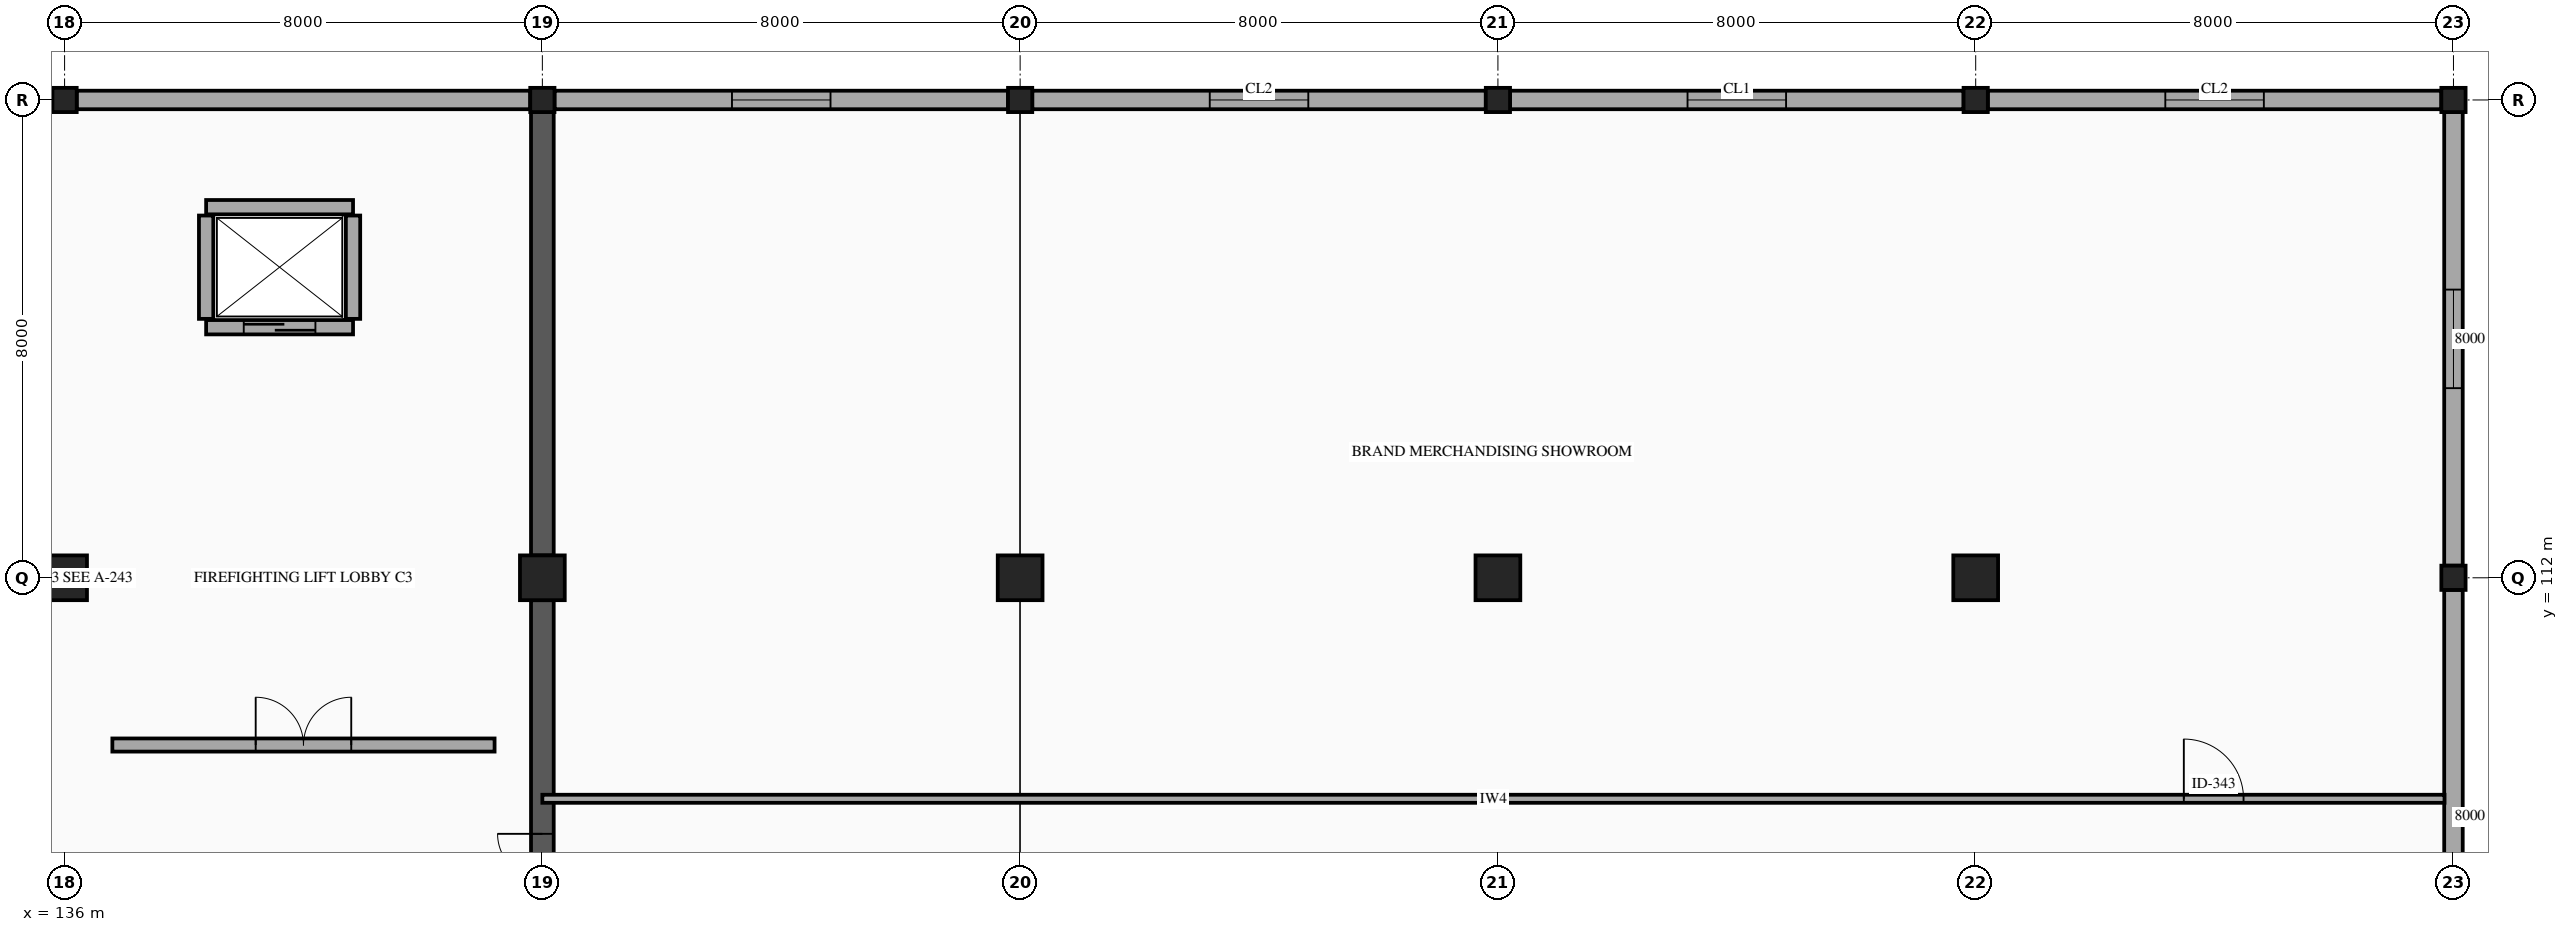
"""IFC4 building model, lengths in metres.
Left out: names, types, materials, properties, quantities, classifications, styles, units other than length and angle.
Written with IfcOpenShell. Run it as: python <this file> out.ifc"""

import sys

from ifc_helpers import new_model, si_unit, direction, frame, frame_2d, origin, origin_2d, place, context, subcontext, project, spatial, rectangle, hollow_rectangle, extrude, element, fill, save


model = new_model("IFC4")
c1 = context("Model", 3, precision=1e-05, world=origin(), true_north=direction((0.0, 1.0)))
c2 = subcontext(c1, "Body", "Model", "MODEL_VIEW")
j1 = project(units=[si_unit("LENGTHUNIT", "METRE"), si_unit("PLANEANGLEUNIT", "RADIAN")], contexts=[c1])
p1 = place(None, origin())
s1 = spatial("IfcSite", under=j1, at=p1, CompositionType="ELEMENT")
p2 = place(p1, origin())
s2 = spatial("IfcBuilding", under=s1, at=p2, CompositionType="ELEMENT")
p3 = place(p2, frame((0.0, 0.0, 14.9)))
s3 = spatial("IfcBuildingStorey", under=s2, at=p3, CompositionType="ELEMENT", Elevation=14.9)
p4 = place(p3, frame((136.0, 112.0, 0.0), z_axis=(0.0, 0.0, 1.0), x_axis=(1.0, 0.0, 0.0)))
e1 = element("IfcColumn", 1, at=p4, inside=s3, PredefinedType="COLUMN", context=c2, shape_type="SweptSolid", body=[
    extrude(rectangle(XDim=0.75, YDim=0.75, at=origin_2d()), origin(), (0.0, 0.0, 1.0), 4.5),
])
p5 = place(p3, frame((136.0, 120.0, 0.0), z_axis=(0.0, 0.0, 1.0), x_axis=(1.0, 0.0, 0.0)))
e2 = element("IfcColumn", 2, at=p5, inside=s3, PredefinedType="COLUMN", context=c2, shape_type="SweptSolid", body=[
    extrude(hollow_rectangle(XDim=0.406, YDim=0.406, WallThickness=0.015, InnerFilletRadius=0.015, OuterFilletRadius=0.029, at=origin_2d()), origin(), (0.0, 0.0, 1.0), 4.5),
])
p6 = place(p3, frame((144.0, 112.0, 0.0), z_axis=(0.0, 0.0, 1.0), x_axis=(1.0, 0.0, 0.0)))
e3 = element("IfcColumn", 3, at=p6, inside=s3, PredefinedType="COLUMN", context=c2, shape_type="SweptSolid", body=[
    extrude(rectangle(XDim=0.75, YDim=0.75, at=origin_2d()), origin(), (0.0, 0.0, 1.0), 4.5),
])
p7 = place(p3, frame((144.0, 120.0, 0.0), z_axis=(0.0, 0.0, 1.0), x_axis=(1.0, 0.0, 0.0)))
e4 = element("IfcColumn", 4, at=p7, inside=s3, PredefinedType="COLUMN", context=c2, shape_type="SweptSolid", body=[
    extrude(hollow_rectangle(XDim=0.406, YDim=0.406, WallThickness=0.015, InnerFilletRadius=0.015, OuterFilletRadius=0.029, at=origin_2d()), origin(), (0.0, 0.0, 1.0), 4.5),
])
p8 = place(p3, frame((152.0, 112.0, 0.0), z_axis=(0.0, 0.0, 1.0), x_axis=(1.0, 0.0, 0.0)))
e5 = element("IfcColumn", 5, at=p8, inside=s3, PredefinedType="COLUMN", context=c2, shape_type="SweptSolid", body=[
    extrude(rectangle(XDim=0.75, YDim=0.75, at=origin_2d()), origin(), (0.0, 0.0, 1.0), 4.5),
])
p9 = place(p3, frame((152.0, 120.0, 0.0), z_axis=(0.0, 0.0, 1.0), x_axis=(1.0, 0.0, 0.0)))
e6 = element("IfcColumn", 6, at=p9, inside=s3, PredefinedType="COLUMN", context=c2, shape_type="SweptSolid", body=[
    extrude(hollow_rectangle(XDim=0.406, YDim=0.406, WallThickness=0.015, InnerFilletRadius=0.015, OuterFilletRadius=0.029, at=origin_2d()), origin(), (0.0, 0.0, 1.0), 4.5),
])
p10 = place(p3, frame((160.0, 112.0, 0.0), z_axis=(0.0, 0.0, 1.0), x_axis=(1.0, 0.0, 0.0)))
e7 = element("IfcColumn", 7, at=p10, inside=s3, PredefinedType="COLUMN", context=c2, shape_type="SweptSolid", body=[
    extrude(rectangle(XDim=0.75, YDim=0.75, at=origin_2d()), origin(), (0.0, 0.0, 1.0), 4.5),
])
p11 = place(p3, frame((160.0, 120.0, 0.0), z_axis=(0.0, 0.0, 1.0), x_axis=(1.0, 0.0, 0.0)))
e8 = element("IfcColumn", 8, at=p11, inside=s3, PredefinedType="COLUMN", context=c2, shape_type="SweptSolid", body=[
    extrude(hollow_rectangle(XDim=0.406, YDim=0.406, WallThickness=0.015, InnerFilletRadius=0.015, OuterFilletRadius=0.029, at=origin_2d()), origin(), (0.0, 0.0, 1.0), 4.5),
])
p12 = place(p3, frame((168.0, 112.0, 0.0), z_axis=(0.0, 0.0, 1.0), x_axis=(1.0, 0.0, 0.0)))
e9 = element("IfcColumn", 9, at=p12, inside=s3, PredefinedType="COLUMN", context=c2, shape_type="SweptSolid", body=[
    extrude(rectangle(XDim=0.75, YDim=0.75, at=origin_2d()), origin(), (0.0, 0.0, 1.0), 4.5),
])
for number, where, z_axis, x_axis in (
    (10, (168.0, 120.0, 0.0), (0.0, 0.0, 1.0), (1.0, 0.0, 0.0)),
    (11, (176.0, 112.0, 0.0), (0.0, 0.0, 1.0), (1.0, 0.0, 0.0)),
    (12, (176.0, 120.0, 0.0), (0.0, 0.0, 1.0), (1.0, 0.0, 0.0)),
):
    element("IfcColumn", number, at=place(p3, frame(where, z_axis=z_axis, x_axis=x_axis)), inside=s3, PredefinedType="COLUMN", context=c2, shape_type="SweptSolid", body=[
        extrude(hollow_rectangle(XDim=0.406, YDim=0.406, WallThickness=0.015, InnerFilletRadius=0.015, OuterFilletRadius=0.029, at=origin_2d()), origin(), (0.0, 0.0, 1.0), 4.5),
    ])
p13 = place(p3, frame((152.203, 120.0, 0.0), z_axis=(0.0, 0.0, 1.0), x_axis=(1.0, 0.0, 0.0)))
e13 = element("IfcWall", 13, at=p13, inside=s3, PredefinedType="STANDARD", context=c2, shape_type="SweptSolid", body=[
    extrude(rectangle(XDim=7.594, YDim=0.31, at=frame_2d((3.797, 0.0))), origin(), (0.0, 0.0, 1.0), 3.48),
])
p14 = place(p13, frame((2.972, 0.0, 0.8)))
e14 = element("IfcOpeningElement", 14, at=p14, cuts=e13, PredefinedType="OPENING", context=c2, shape_type="SweptSolid", body=[
    extrude(rectangle(XDim=1.65, YDim=2.3, at=frame_2d((0.825, 1.15))), frame((0.0, 0.165, 0.0), z_axis=(0.0, -1.0, 0.0), x_axis=(1.0, 0.0, 0.0)), (0.0, 0.0, 1.0), 0.33),
])
p15 = place(p3, frame((160.203, 120.0, 0.0), z_axis=(0.0, 0.0, 1.0), x_axis=(1.0, 0.0, 0.0)))
e15 = element("IfcWall", 15, at=p15, inside=s3, PredefinedType="STANDARD", context=c2, shape_type="SweptSolid", body=[
    extrude(rectangle(XDim=7.594, YDim=0.31, at=frame_2d((3.797, 0.0))), origin(), (0.0, 0.0, 1.0), 3.48),
])
p16 = place(p15, frame((2.972, 0.0, 0.8)))
e16 = element("IfcOpeningElement", 16, at=p16, cuts=e15, PredefinedType="OPENING", context=c2, shape_type="SweptSolid", body=[
    extrude(rectangle(XDim=1.65, YDim=2.3, at=frame_2d((0.825, 1.15))), frame((0.0, 0.165, 0.0), z_axis=(0.0, -1.0, 0.0), x_axis=(1.0, 0.0, 0.0)), (0.0, 0.0, 1.0), 0.33),
])
p17 = place(p3, frame((168.203, 120.0, 0.0), z_axis=(0.0, 0.0, 1.0), x_axis=(1.0, 0.0, 0.0)))
e17 = element("IfcWall", 17, at=p17, inside=s3, PredefinedType="STANDARD", context=c2, shape_type="SweptSolid", body=[
    extrude(rectangle(XDim=7.594, YDim=0.31, at=frame_2d((3.797, 0.0))), origin(), (0.0, 0.0, 1.0), 3.48),
])
p18 = place(p17, frame((2.972, 0.0, 0.8)))
e18 = element("IfcOpeningElement", 18, at=p18, cuts=e17, PredefinedType="OPENING", context=c2, shape_type="SweptSolid", body=[
    extrude(rectangle(XDim=1.65, YDim=2.3, at=frame_2d((0.825, 1.15))), frame((0.0, 0.165, 0.0), z_axis=(0.0, -1.0, 0.0), x_axis=(1.0, 0.0, 0.0)), (0.0, 0.0, 1.0), 0.33),
])
p19 = place(p3, frame((176.0, 119.797, 0.0), z_axis=(0.0, 0.0, 1.0), x_axis=(0.0, -1.0, 0.0)))
e19 = element("IfcWall", 19, at=p19, inside=s3, PredefinedType="STANDARD", context=c2, shape_type="SweptSolid", body=[
    extrude(rectangle(XDim=7.594, YDim=0.31, at=frame_2d((3.797, 0.0))), origin(), (0.0, 0.0, 1.0), 3.48),
])
p20 = place(p19, frame((2.972, 0.0, 0.8)))
e20 = element("IfcOpeningElement", 20, at=p20, cuts=e19, PredefinedType="OPENING", context=c2, shape_type="SweptSolid", body=[
    extrude(rectangle(XDim=1.65, YDim=2.3, at=frame_2d((0.825, 1.15))), frame((0.0, 0.165, 0.0), z_axis=(0.0, -1.0, 0.0), x_axis=(1.0, 0.0, 0.0)), (0.0, 0.0, 1.0), 0.33),
])
for number, where, z_axis, x_axis in (
    (21, (176.0, 111.797, 0.0), (0.0, 0.0, 1.0), (0.0, -1.0, 0.0)),
    (22, (136.203, 120.0, 0.0), (0.0, 0.0, 1.0), (1.0, 0.0, 0.0)),
):
    element("IfcWall", number, at=place(p3, frame(where, z_axis=z_axis, x_axis=x_axis)), inside=s3, PredefinedType="STANDARD", context=c2, shape_type="SweptSolid", body=[
        extrude(rectangle(XDim=7.594, YDim=0.31, at=frame_2d((3.797, 0.0))), origin(), (0.0, 0.0, 1.0), 3.48),
    ])
p21 = place(p3, frame((144.203, 120.0, 0.0), z_axis=(0.0, 0.0, 1.0), x_axis=(1.0, 0.0, 0.0)))
e23 = element("IfcWall", 23, at=p21, inside=s3, PredefinedType="STANDARD", context=c2, shape_type="SweptSolid", body=[
    extrude(rectangle(XDim=7.594, YDim=0.31, at=frame_2d((3.797, 0.0))), origin(), (0.0, 0.0, 1.0), 3.48),
])
p22 = place(p21, frame((2.972, 0.0, 0.8)))
e24 = element("IfcOpeningElement", 24, at=p22, cuts=e23, PredefinedType="OPENING", context=c2, shape_type="SweptSolid", body=[
    extrude(rectangle(XDim=1.65, YDim=2.3, at=frame_2d((0.825, 1.15))), frame((0.0, 0.165, 0.0), z_axis=(0.0, -1.0, 0.0), x_axis=(1.0, 0.0, 0.0)), (0.0, 0.0, 1.0), 0.33),
])
p23 = place(p3, frame((144.0, 104.375, 0.0), z_axis=(0.0, 0.0, 1.0), x_axis=(0.0, 1.0, 0.0)))
e25 = element("IfcWall", 25, at=p23, inside=s3, PredefinedType="SHEAR", context=c2, shape_type="SweptSolid", body=[
    extrude(rectangle(XDim=7.25, YDim=0.38, at=frame_2d((3.625, 0.0))), origin(), (0.0, 0.0, 1.0), 4.28),
])
p24 = place(p23, frame((1.838, 0.0, 0.0)))
e26 = element("IfcOpeningElement", 26, at=p24, cuts=e25, PredefinedType="OPENING", context=c2, shape_type="SweptSolid", body=[
    extrude(rectangle(XDim=1.5, YDim=2.15, at=frame_2d((0.75, 1.075))), frame((0.0, 0.2, 0.0), z_axis=(0.0, -1.0, 0.0), x_axis=(1.0, 0.0, 0.0)), (0.0, 0.0, 1.0), 0.4),
])
p25 = place(p3, frame((144.0, 112.375, 0.0), z_axis=(0.0, 0.0, 1.0), x_axis=(0.0, 1.0, 0.0)))
e27 = element("IfcWall", 27, at=p25, inside=s3, PredefinedType="SHEAR", context=c2, shape_type="SweptSolid", body=[
    extrude(rectangle(XDim=7.422, YDim=0.38, at=frame_2d((3.711, 0.0))), origin(), (0.0, 0.0, 1.0), 4.28),
])
p26 = place(p3, frame((138.37, 116.195, 0.0), z_axis=(0.0, 0.0, 1.0), x_axis=(1.0, 0.0, 0.0)))
e28 = element("IfcWall", 28, at=p26, inside=s3, PredefinedType="PARTITIONING", context=c2, shape_type="SweptSolid", body=[
    extrude(rectangle(XDim=2.46, YDim=0.24, at=frame_2d((1.23, 0.0))), origin(), (0.0, 0.0, 1.0), 4.28),
])
p27 = place(p26, frame((0.63, 0.0, 0.0)))
e29 = element("IfcOpeningElement", 29, at=p27, cuts=e28, PredefinedType="OPENING", context=c2, shape_type="SweptSolid", body=[
    extrude(rectangle(XDim=1.2, YDim=2.15, at=frame_2d((0.6, 1.075))), frame((0.0, 0.13, 0.0), z_axis=(0.0, -1.0, 0.0), x_axis=(1.0, 0.0, 0.0)), (0.0, 0.0, 1.0), 0.26),
])
p28 = place(p3, frame((138.37, 118.205, 0.0), z_axis=(0.0, 0.0, 1.0), x_axis=(1.0, 0.0, 0.0)))
e30 = element("IfcWall", 30, at=p28, inside=s3, PredefinedType="PARTITIONING", context=c2, shape_type="SweptSolid", body=[
    extrude(rectangle(XDim=2.46, YDim=0.24, at=frame_2d((1.23, 0.0))), origin(), (0.0, 0.0, 1.0), 4.28),
])
for number, where, z_axis, x_axis in (
    (31, (138.37, 116.335, 0.0), (0.0, 0.0, 1.0), (0.0, 1.0, 0.0)),
    (32, (140.83, 116.335, 0.0), (0.0, 0.0, 1.0), (0.0, 1.0, 0.0)),
):
    element("IfcWall", number, at=place(p3, frame(where, z_axis=z_axis, x_axis=x_axis)), inside=s3, PredefinedType="PARTITIONING", context=c2, shape_type="SweptSolid", body=[
        extrude(rectangle(XDim=1.73, YDim=0.24, at=frame_2d((0.865, 0.0))), origin(), (0.0, 0.0, 1.0), 4.28),
    ])
p29 = place(p3, frame((136.8, 109.2, 0.0), z_axis=(0.0, 0.0, 1.0), x_axis=(1.0, 0.0, 0.0)))
e33 = element("IfcWall", 33, at=p29, inside=s3, PredefinedType="PARTITIONING", context=c2, shape_type="SweptSolid", body=[
    extrude(rectangle(XDim=6.4, YDim=0.22, at=frame_2d((3.2, 0.0))), origin(), (0.0, 0.0, 1.0), 3.48),
])
p30 = place(p29, frame((2.4, 0.0, 0.0)))
e34 = element("IfcOpeningElement", 34, at=p30, cuts=e33, PredefinedType="OPENING", context=c2, shape_type="SweptSolid", body=[
    extrude(rectangle(XDim=1.6, YDim=2.15, at=frame_2d((0.8, 1.075))), frame((0.0, 0.12, 0.0), z_axis=(0.0, -1.0, 0.0), x_axis=(1.0, 0.0, 0.0)), (0.0, 0.0, 1.0), 0.24),
])
p31 = place(p3, frame((144.0, 108.3, 0.0), z_axis=(0.0, 0.0, 1.0), x_axis=(1.0, 0.0, 0.0)))
e35 = element("IfcWall", 35, at=p31, inside=s3, PredefinedType="PARTITIONING", context=c2, shape_type="SweptSolid", body=[
    extrude(rectangle(XDim=31.85, YDim=0.135, at=frame_2d((15.925, 0.0))), origin(), (0.0, 0.0, 1.0), 3.48),
])
p32 = place(p31, frame((27.485, 0.0, 0.0)))
e36 = element("IfcOpeningElement", 36, at=p32, cuts=e35, PredefinedType="OPENING", context=c2, shape_type="SweptSolid", body=[
    extrude(rectangle(XDim=1.0, YDim=2.15, at=frame_2d((0.5, 1.075))), frame((0.0, 0.077, 0.0), z_axis=(0.0, -1.0, 0.0), x_axis=(1.0, 0.0, 0.0)), (0.0, 0.0, 1.0), 0.155),
])
p33 = place(p14, origin())
e37 = element("IfcWindow", 37, at=p33, inside=s3, PartitioningType="DOUBLE_PANEL_HORIZONTAL", PredefinedType="WINDOW", context=c2, shape_type="SweptSolid", body=[
    extrude(rectangle(XDim=1.65, YDim=2.3, at=frame_2d((0.825, 1.15))), frame((0.0, 0.03, 0.0), z_axis=(0.0, -1.0, 0.0), x_axis=(1.0, 0.0, 0.0)), (0.0, 0.0, 1.0), 0.06),
])
fill(e14, e37)
p34 = place(p16, origin())
e38 = element("IfcWindow", 38, at=p34, inside=s3, PartitioningType="DOUBLE_PANEL_HORIZONTAL", PredefinedType="WINDOW", context=c2, shape_type="SweptSolid", body=[
    extrude(rectangle(XDim=1.65, YDim=2.3, at=frame_2d((0.825, 1.15))), frame((0.0, 0.03, 0.0), z_axis=(0.0, -1.0, 0.0), x_axis=(1.0, 0.0, 0.0)), (0.0, 0.0, 1.0), 0.06),
])
fill(e16, e38)
p35 = place(p18, origin())
e39 = element("IfcWindow", 39, at=p35, inside=s3, PartitioningType="DOUBLE_PANEL_HORIZONTAL", PredefinedType="WINDOW", context=c2, shape_type="SweptSolid", body=[
    extrude(rectangle(XDim=1.65, YDim=2.3, at=frame_2d((0.825, 1.15))), frame((0.0, 0.03, 0.0), z_axis=(0.0, -1.0, 0.0), x_axis=(1.0, 0.0, 0.0)), (0.0, 0.0, 1.0), 0.06),
])
fill(e18, e39)
p36 = place(p20, origin())
e40 = element("IfcWindow", 40, at=p36, inside=s3, PartitioningType="DOUBLE_PANEL_HORIZONTAL", PredefinedType="WINDOW", context=c2, shape_type="SweptSolid", body=[
    extrude(rectangle(XDim=1.65, YDim=2.3, at=frame_2d((0.825, 1.15))), frame((0.0, 0.03, 0.0), z_axis=(0.0, -1.0, 0.0), x_axis=(1.0, 0.0, 0.0)), (0.0, 0.0, 1.0), 0.06),
])
fill(e20, e40)
p37 = place(p22, origin())
e41 = element("IfcWindow", 41, at=p37, inside=s3, PartitioningType="DOUBLE_PANEL_HORIZONTAL", PredefinedType="WINDOW", context=c2, shape_type="SweptSolid", body=[
    extrude(rectangle(XDim=1.65, YDim=2.3, at=frame_2d((0.825, 1.15))), frame((0.0, 0.03, 0.0), z_axis=(0.0, -1.0, 0.0), x_axis=(1.0, 0.0, 0.0)), (0.0, 0.0, 1.0), 0.06),
])
fill(e24, e41)
p38 = place(p24, origin())
e42 = element("IfcDoor", 42, at=p38, inside=s3, OperationType="DOUBLE_DOOR_SINGLE_SWING", PredefinedType="DOOR", context=c2, shape_type="SweptSolid", body=[
    extrude(rectangle(XDim=1.5, YDim=2.15, at=frame_2d((0.75, 1.075))), frame((0.0, 0.025, 0.0), z_axis=(0.0, -1.0, 0.0), x_axis=(1.0, 0.0, 0.0)), (0.0, 0.0, 1.0), 0.05),
])
fill(e26, e42)
p39 = place(p27, origin())
e43 = element("IfcDoor", 43, at=p39, inside=s3, OperationType="SLIDING_TO_LEFT", PredefinedType="DOOR", context=c2, shape_type="SweptSolid", body=[
    extrude(rectangle(XDim=1.2, YDim=2.15, at=frame_2d((0.6, 1.075))), frame((0.0, 0.025, 0.0), z_axis=(0.0, -1.0, 0.0), x_axis=(1.0, 0.0, 0.0)), (0.0, 0.0, 1.0), 0.05),
])
fill(e29, e43)
p40 = place(p30, origin())
e44 = element("IfcDoor", 44, at=p40, inside=s3, OperationType="DOUBLE_DOOR_SINGLE_SWING", PredefinedType="DOOR", context=c2, shape_type="SweptSolid", body=[
    extrude(rectangle(XDim=1.6, YDim=2.15, at=frame_2d((0.8, 1.075))), frame((0.0, 0.025, 0.0), z_axis=(0.0, -1.0, 0.0), x_axis=(1.0, 0.0, 0.0)), (0.0, 0.0, 1.0), 0.05),
])
fill(e34, e44)
p41 = place(p32, origin())
e45 = element("IfcDoor", 45, at=p41, inside=s3, OperationType="SINGLE_SWING_LEFT", PredefinedType="DOOR", context=c2, shape_type="SweptSolid", body=[
    extrude(rectangle(XDim=1.0, YDim=2.15, at=frame_2d((0.5, 1.075))), frame((0.0, 0.025, 0.0), z_axis=(0.0, -1.0, 0.0), x_axis=(1.0, 0.0, 0.0)), (0.0, 0.0, 1.0), 0.05),
])
fill(e36, e45)
save(model, sys.argv[1])
